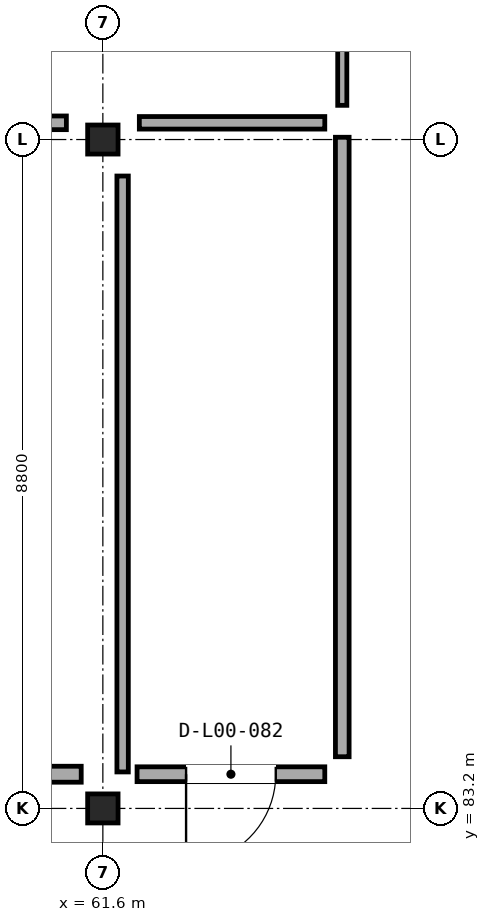
"""IFC4 building model, lengths in metres.
Left out: names, types, materials, properties, quantities, classifications, styles, units other than length and angle.
Written with IfcOpenShell. Run it as: python <this file> out.ifc"""

import sys

from ifc_helpers import new_model, si_unit, direction, frame, frame_2d, origin, origin_2d, place, context, subcontext, project, spatial, rectangle, i_section, extrude, element, fill, save


model = new_model("IFC4")
c1 = context("Model", 3, precision=1e-05, world=origin(), true_north=direction((0.0, 1.0)))
c2 = subcontext(c1, "Body", "Model", "MODEL_VIEW")
j1 = project(units=[si_unit("LENGTHUNIT", "METRE"), si_unit("PLANEANGLEUNIT", "RADIAN")], contexts=[c1])
p1 = place(None, origin())
s1 = spatial("IfcSite", under=j1, at=p1, CompositionType="ELEMENT")
p2 = place(p1, origin())
s2 = spatial("IfcBuilding", under=s1, at=p2, CompositionType="ELEMENT")
p3 = place(p2, origin())
s3 = spatial("IfcBuildingStorey", under=s2, at=p3, CompositionType="ELEMENT", Elevation=0.0)
for number, where, z_axis, x_axis in (
    (1, (61.6, 83.2, 0.0), (0.0, 0.0, 1.0), (1.0, 0.0, 0.0)),
    (2, (61.6, 92.0, 0.0), (0.0, 0.0, 1.0), (1.0, 0.0, 0.0)),
):
    element("IfcColumn", number, at=place(p3, frame(where, z_axis=z_axis, x_axis=x_axis)), inside=s3, PredefinedType="COLUMN", context=c2, shape_type="SweptSolid", body=[
        extrude(i_section(OverallWidth=0.4, OverallDepth=0.382, WebThickness=0.025, FlangeThickness=0.036, at=origin_2d()), origin(), (0.0, 0.0, 1.0), 5.6),
    ])
p4 = place(p3, frame((64.75, 109.63, 0.0), z_axis=(0.0, 0.0, 1.0), x_axis=(0.0, -1.0, 0.0)))
e3 = element("IfcWall", 3, at=p4, inside=s3, PredefinedType="PARTITIONING", context=c2, shape_type="SweptSolid", body=[
    extrude(rectangle(XDim=17.18, YDim=0.12, at=frame_2d((8.59, 0.0))), origin(), (0.0, 0.0, 1.0), 4.638),
])
p5 = place(p4, frame((8.07, 0.0, 0.0)))
e4 = element("IfcOpeningElement", 4, at=p5, cuts=e3, PredefinedType="OPENING", context=c2, shape_type="SweptSolid", body=[
    extrude(rectangle(XDim=1.04, YDim=2.08, at=frame_2d((0.52, 1.04))), frame((0.0, 0.07, 0.0), z_axis=(0.0, -1.0, 0.0), x_axis=(1.0, 0.0, 0.0)), (0.0, 0.0, 1.0), 0.14),
])
p6 = place(p3, frame((61.315, 83.65, 0.0), z_axis=(0.0, 0.0, 1.0), x_axis=(-1.0, 0.0, 0.0)))
e5 = element("IfcWall", 5, at=p6, inside=s3, PredefinedType="PARTITIONING", context=c2, shape_type="SweptSolid", body=[
    extrude(rectangle(XDim=9.031, YDim=0.21, at=frame_2d((4.515, 0.0))), origin(), (0.0, 0.0, 1.0), 4.717),
])
p7 = place(p6, frame((3.965, 0.0, 0.0)))
e6 = element("IfcOpeningElement", 6, at=p7, cuts=e5, PredefinedType="OPENING", context=c2, shape_type="SweptSolid", body=[
    extrude(rectangle(XDim=1.1, YDim=2.08, at=frame_2d((0.55, 1.04))), frame((0.0, 0.115, 0.0), z_axis=(0.0, -1.0, 0.0), x_axis=(1.0, 0.0, 0.0)), (0.0, 0.0, 1.0), 0.23),
])
p8 = place(p3, frame((64.52, 83.65, 0.0), z_axis=(0.0, 0.0, 1.0), x_axis=(-1.0, 0.0, 0.0)))
e7 = element("IfcWall", 7, at=p8, inside=s3, PredefinedType="PARTITIONING", context=c2, shape_type="SweptSolid", body=[
    extrude(rectangle(XDim=2.47, YDim=0.195, at=frame_2d((1.235, 0.0))), origin(), (0.0, 0.0, 1.0), 4.943),
])
p9 = place(p8, frame((0.645, 0.0, 0.0)))
e8 = element("IfcOpeningElement", 8, at=p9, cuts=e7, PredefinedType="OPENING", context=c2, shape_type="SweptSolid", body=[
    extrude(rectangle(XDim=1.18, YDim=2.08, at=frame_2d((0.59, 1.04))), frame((0.0, 0.107, 0.0), z_axis=(0.0, -1.0, 0.0), x_axis=(1.0, 0.0, 0.0)), (0.0, 0.0, 1.0), 0.215),
])
p10 = place(p3, frame((64.75, 92.03, 0.0), z_axis=(0.0, 0.0, 1.0), x_axis=(0.0, -1.0, 0.0)))
e9 = element("IfcWall", 9, at=p10, inside=s3, PredefinedType="PARTITIONING", context=c2, shape_type="SweptSolid", body=[
    extrude(rectangle(XDim=8.15, YDim=0.18, at=frame_2d((4.075, 0.0))), origin(), (0.0, 0.0, 1.0), 4.638),
])
p11 = place(p3, frame((61.12, 92.22, 0.0), z_axis=(0.0, 0.0, 1.0), x_axis=(-1.0, 0.0, 0.0)))
e10 = element("IfcWall", 10, at=p11, inside=s3, PredefinedType="PARTITIONING", context=c2, shape_type="SweptSolid", body=[
    extrude(rectangle(XDim=8.64, YDim=0.18, at=frame_2d((4.32, 0.0))), origin(), (0.0, 0.0, 1.0), 4.638),
])
p12 = place(p3, frame((64.52, 92.22, 0.0), z_axis=(0.0, 0.0, 1.0), x_axis=(-1.0, 0.0, 0.0)))
e11 = element("IfcWall", 11, at=p12, inside=s3, PredefinedType="PARTITIONING", context=c2, shape_type="SweptSolid", body=[
    extrude(rectangle(XDim=2.44, YDim=0.165, at=frame_2d((1.22, 0.0))), origin(), (0.0, 0.0, 1.0), 4.638),
])
p13 = place(p3, frame((61.86, 91.52, 0.0), z_axis=(0.0, 0.0, 1.0), x_axis=(0.0, -1.0, 0.0)))
e12 = element("IfcWall", 12, at=p13, inside=s3, PredefinedType="PARTITIONING", context=c2, shape_type="SweptSolid", body=[
    extrude(rectangle(XDim=7.84, YDim=0.15, at=frame_2d((3.92, 0.0))), origin(), (0.0, 0.0, 1.0), 4.717),
])
p14 = place(p9, origin())
e13 = element("IfcDoor", 13, at=p14, inside=s3, OperationType="SINGLE_SWING_RIGHT", PredefinedType="DOOR", context=c2, shape_type="SweptSolid", body=[
    extrude(rectangle(XDim=1.18, YDim=2.08, at=frame_2d((0.59, 1.04))), frame((0.0, 0.025, 0.0), z_axis=(0.0, -1.0, 0.0), x_axis=(1.0, 0.0, 0.0)), (0.0, 0.0, 1.0), 0.05),
])
fill(e8, e13)
save(model, sys.argv[1])
